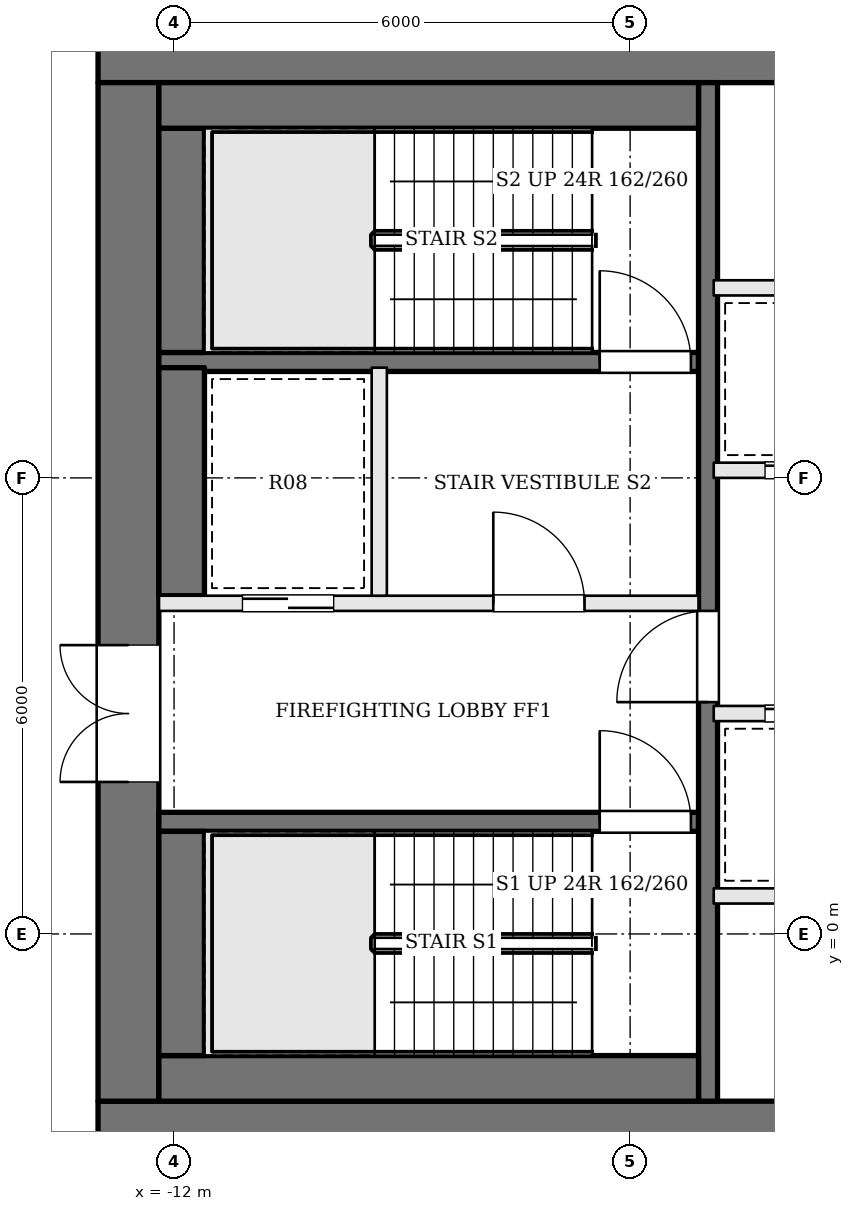
"""IFC4 building model, lengths in metres.
Left out: names, types, materials, properties, quantities, classifications, styles, units other than length and angle.
Written with IfcOpenShell. Run it as: python <this file> out.ifc"""

import sys

from ifc_helpers import new_model, si_unit, direction, frame, frame_2d, origin, place, context, subcontext, project, spatial, rectangle, extrude, element, fill, save


model = new_model("IFC4")
c1 = context("Model", 3, precision=1e-05, world=origin(), true_north=direction((0.0, 1.0)))
c2 = subcontext(c1, "Body", "Model", "MODEL_VIEW")
j1 = project(units=[si_unit("LENGTHUNIT", "METRE"), si_unit("PLANEANGLEUNIT", "RADIAN")], contexts=[c1])
p1 = place(None, origin())
s1 = spatial("IfcSite", under=j1, at=p1, CompositionType="ELEMENT")
p2 = place(p1, origin())
s2 = spatial("IfcBuilding", under=s1, at=p2, CompositionType="ELEMENT")
p3 = place(p2, frame((0.0, 0.0, 213.0)))
s3 = spatial("IfcBuildingStorey", under=s2, at=p3, CompositionType="ELEMENT", Elevation=213.0)
p4 = place(p3, frame((-13.0, 11.6, 0.0), z_axis=(0.0, 0.0, 1.0), x_axis=(1.0, 0.0, 0.0)))
e1 = element("IfcWall", 1, at=p4, inside=s3, PredefinedType="SHEAR", context=c2, shape_type="SweptSolid", body=[
    extrude(rectangle(XDim=26.0, YDim=0.8, at=frame_2d((13.0, 0.0))), origin(), (0.0, 0.0, 1.0), 3.9),
])
p5 = place(p4, frame((9.225, 0.0, 0.0)))
e2 = element("IfcOpeningElement", 2, at=p5, cuts=e1, PredefinedType="OPENING", context=c2, shape_type="SweptSolid", body=[
    extrude(rectangle(XDim=1.0, YDim=2.1, at=frame_2d((0.5, 1.05))), frame((0.0, 0.41, 0.0), z_axis=(0.0, -1.0, 0.0), x_axis=(1.0, 0.0, 0.0)), (0.0, 0.0, 1.0), 0.82),
])
p6 = place(p4, frame((11.825, 0.0, 0.0)))
e3 = element("IfcOpeningElement", 3, at=p6, cuts=e1, PredefinedType="OPENING", context=c2, shape_type="SweptSolid", body=[
    extrude(rectangle(XDim=0.7, YDim=2.1, at=frame_2d((0.35, 1.05))), frame((0.0, 0.41, 0.0), z_axis=(0.0, -1.0, 0.0), x_axis=(1.0, 0.0, 0.0)), (0.0, 0.0, 1.0), 0.82),
])
p7 = place(p4, frame((14.125, 0.0, 0.0)))
e4 = element("IfcOpeningElement", 4, at=p7, cuts=e1, PredefinedType="OPENING", context=c2, shape_type="SweptSolid", body=[
    extrude(rectangle(XDim=1.0, YDim=2.1, at=frame_2d((0.5, 1.05))), frame((0.0, 0.41, 0.0), z_axis=(0.0, -1.0, 0.0), x_axis=(1.0, 0.0, 0.0)), (0.0, 0.0, 1.0), 0.82),
])
p8 = place(p4, frame((16.625, 0.0, 0.0)))
e5 = element("IfcOpeningElement", 5, at=p8, cuts=e1, PredefinedType="OPENING", context=c2, shape_type="SweptSolid", body=[
    extrude(rectangle(XDim=0.9, YDim=2.1, at=frame_2d((0.45, 1.05))), frame((0.0, 0.41, 0.0), z_axis=(0.0, -1.0, 0.0), x_axis=(1.0, 0.0, 0.0)), (0.0, 0.0, 1.0), 0.82),
])
p9 = place(p3, frame((-13.0, -2.6, 0.0), z_axis=(0.0, 0.0, 1.0), x_axis=(1.0, 0.0, 0.0)))
e6 = element("IfcWall", 6, at=p9, inside=s3, PredefinedType="SHEAR", context=c2, shape_type="SweptSolid", body=[
    extrude(rectangle(XDim=26.0, YDim=0.8, at=frame_2d((13.0, 0.0))), origin(), (0.0, 0.0, 1.0), 3.9),
])
p10 = place(p9, frame((8.925, 0.0, 0.0)))
e7 = element("IfcOpeningElement", 7, at=p10, cuts=e6, PredefinedType="OPENING", context=c2, shape_type="SweptSolid", body=[
    extrude(rectangle(XDim=0.9, YDim=2.1, at=frame_2d((0.45, 1.05))), frame((0.0, 0.41, 0.0), z_axis=(0.0, -1.0, 0.0), x_axis=(1.0, 0.0, 0.0)), (0.0, 0.0, 1.0), 0.82),
])
p11 = place(p9, frame((11.475, 0.0, 0.0)))
e8 = element("IfcOpeningElement", 8, at=p11, cuts=e6, PredefinedType="OPENING", context=c2, shape_type="SweptSolid", body=[
    extrude(rectangle(XDim=0.9, YDim=2.1, at=frame_2d((0.45, 1.05))), frame((0.0, 0.41, 0.0), z_axis=(0.0, -1.0, 0.0), x_axis=(1.0, 0.0, 0.0)), (0.0, 0.0, 1.0), 0.82),
])
p12 = place(p9, frame((13.6, 0.0, 0.0)))
e9 = element("IfcOpeningElement", 9, at=p12, cuts=e6, PredefinedType="OPENING", context=c2, shape_type="SweptSolid", body=[
    extrude(rectangle(XDim=1.0, YDim=2.1, at=frame_2d((0.5, 1.05))), frame((0.0, 0.41, 0.0), z_axis=(0.0, -1.0, 0.0), x_axis=(1.0, 0.0, 0.0)), (0.0, 0.0, 1.0), 0.82),
])
p13 = place(p9, frame((15.95, 0.0, 0.0)))
e10 = element("IfcOpeningElement", 10, at=p13, cuts=e6, PredefinedType="OPENING", context=c2, shape_type="SweptSolid", body=[
    extrude(rectangle(XDim=1.0, YDim=2.1, at=frame_2d((0.5, 1.05))), frame((0.0, 0.41, 0.0), z_axis=(0.0, -1.0, 0.0), x_axis=(1.0, 0.0, 0.0)), (0.0, 0.0, 1.0), 0.82),
])
p14 = place(p3, frame((-12.6, -2.2, 0.0), z_axis=(0.0, 0.0, 1.0), x_axis=(0.0, 1.0, 0.0)))
e11 = element("IfcWall", 11, at=p14, inside=s3, PredefinedType="SHEAR", context=c2, shape_type="SweptSolid", body=[
    extrude(rectangle(XDim=13.4, YDim=0.8, at=frame_2d((6.7, 0.0))), origin(), (0.0, 0.0, 1.0), 3.9),
])
p15 = place(p14, frame((4.2, 0.0, 0.0)))
e12 = element("IfcOpeningElement", 12, at=p15, cuts=e11, PredefinedType="OPENING", context=c2, shape_type="SweptSolid", body=[
    extrude(rectangle(XDim=1.8, YDim=2.1, at=frame_2d((0.9, 1.05))), frame((0.0, 0.41, 0.0), z_axis=(0.0, -1.0, 0.0), x_axis=(1.0, 0.0, 0.0)), (0.0, 0.0, 1.0), 0.82),
])
p16 = place(p3, frame((-12.2, 1.475, 0.0), z_axis=(0.0, 0.0, 1.0), x_axis=(1.0, 0.0, 0.0)))
e13 = element("IfcWall", 13, at=p16, inside=s3, PredefinedType="SOLIDWALL", context=c2, shape_type="SweptSolid", body=[
    extrude(rectangle(XDim=7.1, YDim=0.25, at=frame_2d((3.55, 0.0))), origin(), (0.0, 0.0, 1.0), 3.6),
])
p17 = place(p16, frame((5.8, 0.0, 0.0)))
e14 = element("IfcOpeningElement", 14, at=p17, cuts=e13, PredefinedType="OPENING", context=c2, shape_type="SweptSolid", body=[
    extrude(rectangle(XDim=1.2, YDim=2.1, at=frame_2d((0.6, 1.05))), frame((0.0, 0.135, 0.0), z_axis=(0.0, -1.0, 0.0), x_axis=(1.0, 0.0, 0.0)), (0.0, 0.0, 1.0), 0.27),
])
p18 = place(p3, frame((-12.2, 4.35, 0.0), z_axis=(0.0, 0.0, 1.0), x_axis=(1.0, 0.0, 0.0)))
e15 = element("IfcWall", 15, at=p18, inside=s3, PredefinedType="SOLIDWALL", context=c2, shape_type="SweptSolid", body=[
    extrude(rectangle(XDim=7.1, YDim=0.2, at=frame_2d((3.55, 0.0))), origin(), (0.0, 0.0, 1.0), 3.6),
])
p19 = place(p18, frame((4.4, 0.0, 0.0)))
e16 = element("IfcOpeningElement", 16, at=p19, cuts=e15, PredefinedType="OPENING", context=c2, shape_type="SweptSolid", body=[
    extrude(rectangle(XDim=1.2, YDim=2.1, at=frame_2d((0.6, 1.05))), frame((0.0, 0.11, 0.0), z_axis=(0.0, -1.0, 0.0), x_axis=(1.0, 0.0, 0.0)), (0.0, 0.0, 1.0), 0.22),
])
p20 = place(p18, frame((1.1, 0.0, 0.0)))
e17 = element("IfcOpeningElement", 17, at=p20, cuts=e15, PredefinedType="OPENING", context=c2, shape_type="SweptSolid", body=[
    extrude(rectangle(XDim=1.2, YDim=2.1, at=frame_2d((0.6, 1.05))), frame((0.0, 0.11, 0.0), z_axis=(0.0, -1.0, 0.0), x_axis=(1.0, 0.0, 0.0)), (0.0, 0.0, 1.0), 0.22),
])
p21 = place(p3, frame((-12.2, 7.525, 0.0), z_axis=(0.0, 0.0, 1.0), x_axis=(1.0, 0.0, 0.0)))
e18 = element("IfcWall", 18, at=p21, inside=s3, PredefinedType="SOLIDWALL", context=c2, shape_type="SweptSolid", body=[
    extrude(rectangle(XDim=7.1, YDim=0.25, at=frame_2d((3.55, 0.0))), origin(), (0.0, 0.0, 1.0), 3.6),
])
p22 = place(p21, frame((5.8, 0.0, 0.0)))
e19 = element("IfcOpeningElement", 19, at=p22, cuts=e18, PredefinedType="OPENING", context=c2, shape_type="SweptSolid", body=[
    extrude(rectangle(XDim=1.2, YDim=2.1, at=frame_2d((0.6, 1.05))), frame((0.0, 0.135, 0.0), z_axis=(0.0, -1.0, 0.0), x_axis=(1.0, 0.0, 0.0)), (0.0, 0.0, 1.0), 0.27),
])
p23 = place(p3, frame((-9.3, 4.45, 0.0), z_axis=(0.0, 0.0, 1.0), x_axis=(0.0, 1.0, 0.0)))
e20 = element("IfcWall", 20, at=p23, inside=s3, PredefinedType="SOLIDWALL", context=c2, shape_type="SweptSolid", body=[
    extrude(rectangle(XDim=3.0, YDim=0.2, at=frame_2d((1.5, 0.0))), origin(), (0.0, 0.0, 1.0), 3.6),
])
p24 = place(p3, frame((-4.975, -2.2, 0.0), z_axis=(0.0, 0.0, 1.0), x_axis=(0.0, 1.0, 0.0)))
e21 = element("IfcWall", 21, at=p24, inside=s3, PredefinedType="SOLIDWALL", context=c2, shape_type="SweptSolid", body=[
    extrude(rectangle(XDim=13.4, YDim=0.25, at=frame_2d((6.7, 0.0))), origin(), (0.0, 0.0, 1.0), 3.6),
])
p25 = place(p24, frame((5.25, 0.0, 0.0)))
e22 = element("IfcOpeningElement", 22, at=p25, cuts=e21, PredefinedType="OPENING", context=c2, shape_type="SweptSolid", body=[
    extrude(rectangle(XDim=1.2, YDim=2.1, at=frame_2d((0.6, 1.05))), frame((0.0, 0.135, 0.0), z_axis=(0.0, -1.0, 0.0), x_axis=(1.0, 0.0, 0.0)), (0.0, 0.0, 1.0), 0.27),
])
p26 = place(p3, frame((-12.2, -1.9, 0.0), z_axis=(0.0, 0.0, 1.0), x_axis=(1.0, 0.0, 0.0)))
e23 = element("IfcWall", 23, at=p26, inside=s3, PredefinedType="SOLIDWALL", context=c2, shape_type="SweptSolid", body=[
    extrude(rectangle(XDim=7.1, YDim=0.6, at=frame_2d((3.55, 0.0))), origin(), (0.0, 0.0, 1.0), 3.6),
])
p27 = place(p3, frame((-11.9, -1.6, 0.0), z_axis=(0.0, 0.0, 1.0), x_axis=(0.0, 1.0, 0.0)))
e24 = element("IfcWall", 24, at=p27, inside=s3, PredefinedType="SOLIDWALL", context=c2, shape_type="SweptSolid", body=[
    extrude(rectangle(XDim=2.95, YDim=0.6, at=frame_2d((1.475, 0.0))), origin(), (0.0, 0.0, 1.0), 3.6),
])
p28 = place(p3, frame((-11.9, 4.45, 0.0), z_axis=(0.0, 0.0, 1.0), x_axis=(0.0, 1.0, 0.0)))
e25 = element("IfcWall", 25, at=p28, inside=s3, PredefinedType="SOLIDWALL", context=c2, shape_type="SweptSolid", body=[
    extrude(rectangle(XDim=3.0, YDim=0.6, at=frame_2d((1.5, 0.0))), origin(), (0.0, 0.0, 1.0), 3.6),
])
p29 = place(p3, frame((-11.9, 7.65, 0.0), z_axis=(0.0, 0.0, 1.0), x_axis=(0.0, 1.0, 0.0)))
e26 = element("IfcWall", 26, at=p29, inside=s3, PredefinedType="SOLIDWALL", context=c2, shape_type="SweptSolid", body=[
    extrude(rectangle(XDim=2.95, YDim=0.6, at=frame_2d((1.475, 0.0))), origin(), (0.0, 0.0, 1.0), 3.6),
])
p30 = place(p3, frame((-12.2, 10.9, 0.0), z_axis=(0.0, 0.0, 1.0), x_axis=(1.0, 0.0, 0.0)))
e27 = element("IfcWall", 27, at=p30, inside=s3, PredefinedType="SOLIDWALL", context=c2, shape_type="SweptSolid", body=[
    extrude(rectangle(XDim=7.1, YDim=0.6, at=frame_2d((3.55, 0.0))), origin(), (0.0, 0.0, 1.0), 3.6),
])
p31 = place(p3, frame((-4.9, 0.5, 0.0), z_axis=(0.0, 0.0, 1.0), x_axis=(1.0, 0.0, 0.0)))
e28 = element("IfcWall", 28, at=p31, inside=s3, PredefinedType="SOLIDWALL", context=c2, shape_type="SweptSolid", body=[
    extrude(rectangle(XDim=9.8, YDim=0.2, at=frame_2d((4.9, 0.0))), origin(), (0.0, 0.0, 1.0), 3.6),
])
p32 = place(p3, frame((-4.9, 2.9, 0.0), z_axis=(0.0, 0.0, 1.0), x_axis=(1.0, 0.0, 0.0)))
e29 = element("IfcWall", 29, at=p32, inside=s3, PredefinedType="SOLIDWALL", context=c2, shape_type="SweptSolid", body=[
    extrude(rectangle(XDim=9.8, YDim=0.2, at=frame_2d((4.9, 0.0))), origin(), (0.0, 0.0, 1.0), 3.6),
])
p33 = place(p32, frame((0.675, 0.0, 0.0)))
e30 = element("IfcOpeningElement", 30, at=p33, cuts=e29, PredefinedType="OPENING", context=c2, shape_type="SweptSolid", body=[
    extrude(rectangle(XDim=1.1, YDim=2.1, at=frame_2d((0.55, 1.05))), frame((0.0, 0.11, 0.0), z_axis=(0.0, -1.0, 0.0), x_axis=(1.0, 0.0, 0.0)), (0.0, 0.0, 1.0), 0.22),
])
p34 = place(p32, frame((2.613, 0.0, 0.0)))
e31 = element("IfcOpeningElement", 31, at=p34, cuts=e29, PredefinedType="OPENING", context=c2, shape_type="SweptSolid", body=[
    extrude(rectangle(XDim=0.9, YDim=2.1, at=frame_2d((0.45, 1.05))), frame((0.0, 0.11, 0.0), z_axis=(0.0, -1.0, 0.0), x_axis=(1.0, 0.0, 0.0)), (0.0, 0.0, 1.0), 0.22),
])
p35 = place(p32, frame((4.35, 0.0, 0.0)))
e32 = element("IfcOpeningElement", 32, at=p35, cuts=e29, PredefinedType="OPENING", context=c2, shape_type="SweptSolid", body=[
    extrude(rectangle(XDim=1.1, YDim=2.1, at=frame_2d((0.55, 1.05))), frame((0.0, 0.11, 0.0), z_axis=(0.0, -1.0, 0.0), x_axis=(1.0, 0.0, 0.0)), (0.0, 0.0, 1.0), 0.22),
])
p36 = place(p32, frame((7.463, 0.0, 0.0)))
e33 = element("IfcOpeningElement", 33, at=p36, cuts=e29, PredefinedType="OPENING", context=c2, shape_type="SweptSolid", body=[
    extrude(rectangle(XDim=1.0, YDim=2.1, at=frame_2d((0.5, 1.05))), frame((0.0, 0.11, 0.0), z_axis=(0.0, -1.0, 0.0), x_axis=(1.0, 0.0, 0.0)), (0.0, 0.0, 1.0), 0.22),
])
p37 = place(p3, frame((-4.9, 6.1, 0.0), z_axis=(0.0, 0.0, 1.0), x_axis=(1.0, 0.0, 0.0)))
e34 = element("IfcWall", 34, at=p37, inside=s3, PredefinedType="SOLIDWALL", context=c2, shape_type="SweptSolid", body=[
    extrude(rectangle(XDim=9.8, YDim=0.2, at=frame_2d((4.9, 0.0))), origin(), (0.0, 0.0, 1.0), 3.6),
])
p38 = place(p37, frame((0.675, 0.0, 0.0)))
e35 = element("IfcOpeningElement", 35, at=p38, cuts=e34, PredefinedType="OPENING", context=c2, shape_type="SweptSolid", body=[
    extrude(rectangle(XDim=1.1, YDim=2.1, at=frame_2d((0.55, 1.05))), frame((0.0, 0.11, 0.0), z_axis=(0.0, -1.0, 0.0), x_axis=(1.0, 0.0, 0.0)), (0.0, 0.0, 1.0), 0.22),
])
p39 = place(p37, frame((3.125, 0.0, 0.0)))
e36 = element("IfcOpeningElement", 36, at=p39, cuts=e34, PredefinedType="OPENING", context=c2, shape_type="SweptSolid", body=[
    extrude(rectangle(XDim=1.1, YDim=2.1, at=frame_2d((0.55, 1.05))), frame((0.0, 0.11, 0.0), z_axis=(0.0, -1.0, 0.0), x_axis=(1.0, 0.0, 0.0)), (0.0, 0.0, 1.0), 0.22),
])
p40 = place(p37, frame((5.575, 0.0, 0.0)))
e37 = element("IfcOpeningElement", 37, at=p40, cuts=e34, PredefinedType="OPENING", context=c2, shape_type="SweptSolid", body=[
    extrude(rectangle(XDim=1.1, YDim=2.1, at=frame_2d((0.55, 1.05))), frame((0.0, 0.11, 0.0), z_axis=(0.0, -1.0, 0.0), x_axis=(1.0, 0.0, 0.0)), (0.0, 0.0, 1.0), 0.22),
])
p41 = place(p37, frame((8.025, 0.0, 0.0)))
e38 = element("IfcOpeningElement", 38, at=p41, cuts=e34, PredefinedType="OPENING", context=c2, shape_type="SweptSolid", body=[
    extrude(rectangle(XDim=1.1, YDim=2.1, at=frame_2d((0.55, 1.05))), frame((0.0, 0.11, 0.0), z_axis=(0.0, -1.0, 0.0), x_axis=(1.0, 0.0, 0.0)), (0.0, 0.0, 1.0), 0.22),
])
p42 = place(p3, frame((-4.9, 8.5, 0.0), z_axis=(0.0, 0.0, 1.0), x_axis=(1.0, 0.0, 0.0)))
e39 = element("IfcWall", 39, at=p42, inside=s3, PredefinedType="SOLIDWALL", context=c2, shape_type="SweptSolid", body=[
    extrude(rectangle(XDim=9.8, YDim=0.2, at=frame_2d((4.9, 0.0))), origin(), (0.0, 0.0, 1.0), 3.6),
])
p43 = place(p15, origin())
e40 = element("IfcDoor", 40, at=p43, inside=s3, OperationType="DOUBLE_DOOR_SINGLE_SWING", PredefinedType="DOOR", context=c2, shape_type="SweptSolid", body=[
    extrude(rectangle(XDim=1.8, YDim=2.1, at=frame_2d((0.9, 1.05))), frame((0.0, 0.025, 0.0), z_axis=(0.0, -1.0, 0.0), x_axis=(1.0, 0.0, 0.0)), (0.0, 0.0, 1.0), 0.05),
])
fill(e12, e40)
p44 = place(p25, origin())
e41 = element("IfcDoor", 41, at=p44, inside=s3, OperationType="SINGLE_SWING_LEFT", PredefinedType="DOOR", context=c2, shape_type="SweptSolid", body=[
    extrude(rectangle(XDim=1.2, YDim=2.1, at=frame_2d((0.6, 1.05))), frame((0.0, 0.025, 0.0), z_axis=(0.0, -1.0, 0.0), x_axis=(1.0, 0.0, 0.0)), (0.0, 0.0, 1.0), 0.05),
])
fill(e22, e41)
p45 = place(p19, origin())
e42 = element("IfcDoor", 42, at=p45, inside=s3, OperationType="SINGLE_SWING_LEFT", PredefinedType="DOOR", context=c2, shape_type="SweptSolid", body=[
    extrude(rectangle(XDim=1.2, YDim=2.1, at=frame_2d((0.6, 1.05))), frame((0.0, 0.025, 0.0), z_axis=(0.0, -1.0, 0.0), x_axis=(1.0, 0.0, 0.0)), (0.0, 0.0, 1.0), 0.05),
])
fill(e16, e42)
p46 = place(p17, origin())
e43 = element("IfcDoor", 43, at=p46, inside=s3, OperationType="SINGLE_SWING_LEFT", PredefinedType="DOOR", context=c2, shape_type="SweptSolid", body=[
    extrude(rectangle(XDim=1.2, YDim=2.1, at=frame_2d((0.6, 1.05))), frame((0.0, 0.025, 0.0), z_axis=(0.0, -1.0, 0.0), x_axis=(1.0, 0.0, 0.0)), (0.0, 0.0, 1.0), 0.05),
])
fill(e14, e43)
p47 = place(p22, origin())
e44 = element("IfcDoor", 44, at=p47, inside=s3, OperationType="SINGLE_SWING_LEFT", PredefinedType="DOOR", context=c2, shape_type="SweptSolid", body=[
    extrude(rectangle(XDim=1.2, YDim=2.1, at=frame_2d((0.6, 1.05))), frame((0.0, 0.025, 0.0), z_axis=(0.0, -1.0, 0.0), x_axis=(1.0, 0.0, 0.0)), (0.0, 0.0, 1.0), 0.05),
])
fill(e19, e44)
p48 = place(p20, origin())
e45 = element("IfcDoor", 45, at=p48, inside=s3, OperationType="SLIDING_TO_RIGHT", PredefinedType="DOOR", context=c2, shape_type="SweptSolid", body=[
    extrude(rectangle(XDim=1.2, YDim=2.1, at=frame_2d((0.6, 1.05))), frame((0.0, 0.025, 0.0), z_axis=(0.0, -1.0, 0.0), x_axis=(1.0, 0.0, 0.0)), (0.0, 0.0, 1.0), 0.05),
])
fill(e17, e45)
p49 = place(p33, origin())
e46 = element("IfcDoor", 46, at=p49, inside=s3, OperationType="SLIDING_TO_RIGHT", PredefinedType="DOOR", context=c2, shape_type="SweptSolid", body=[
    extrude(rectangle(XDim=1.1, YDim=2.1, at=frame_2d((0.55, 1.05))), frame((0.0, 0.025, 0.0), z_axis=(0.0, -1.0, 0.0), x_axis=(1.0, 0.0, 0.0)), (0.0, 0.0, 1.0), 0.05),
])
fill(e30, e46)
p50 = place(p38, origin())
e47 = element("IfcDoor", 47, at=p50, inside=s3, OperationType="SLIDING_TO_RIGHT", PredefinedType="DOOR", context=c2, shape_type="SweptSolid", body=[
    extrude(rectangle(XDim=1.1, YDim=2.1, at=frame_2d((0.55, 1.05))), frame((0.0, 0.025, 0.0), z_axis=(0.0, -1.0, 0.0), x_axis=(1.0, 0.0, 0.0)), (0.0, 0.0, 1.0), 0.05),
])
fill(e35, e47)
save(model, sys.argv[1])
